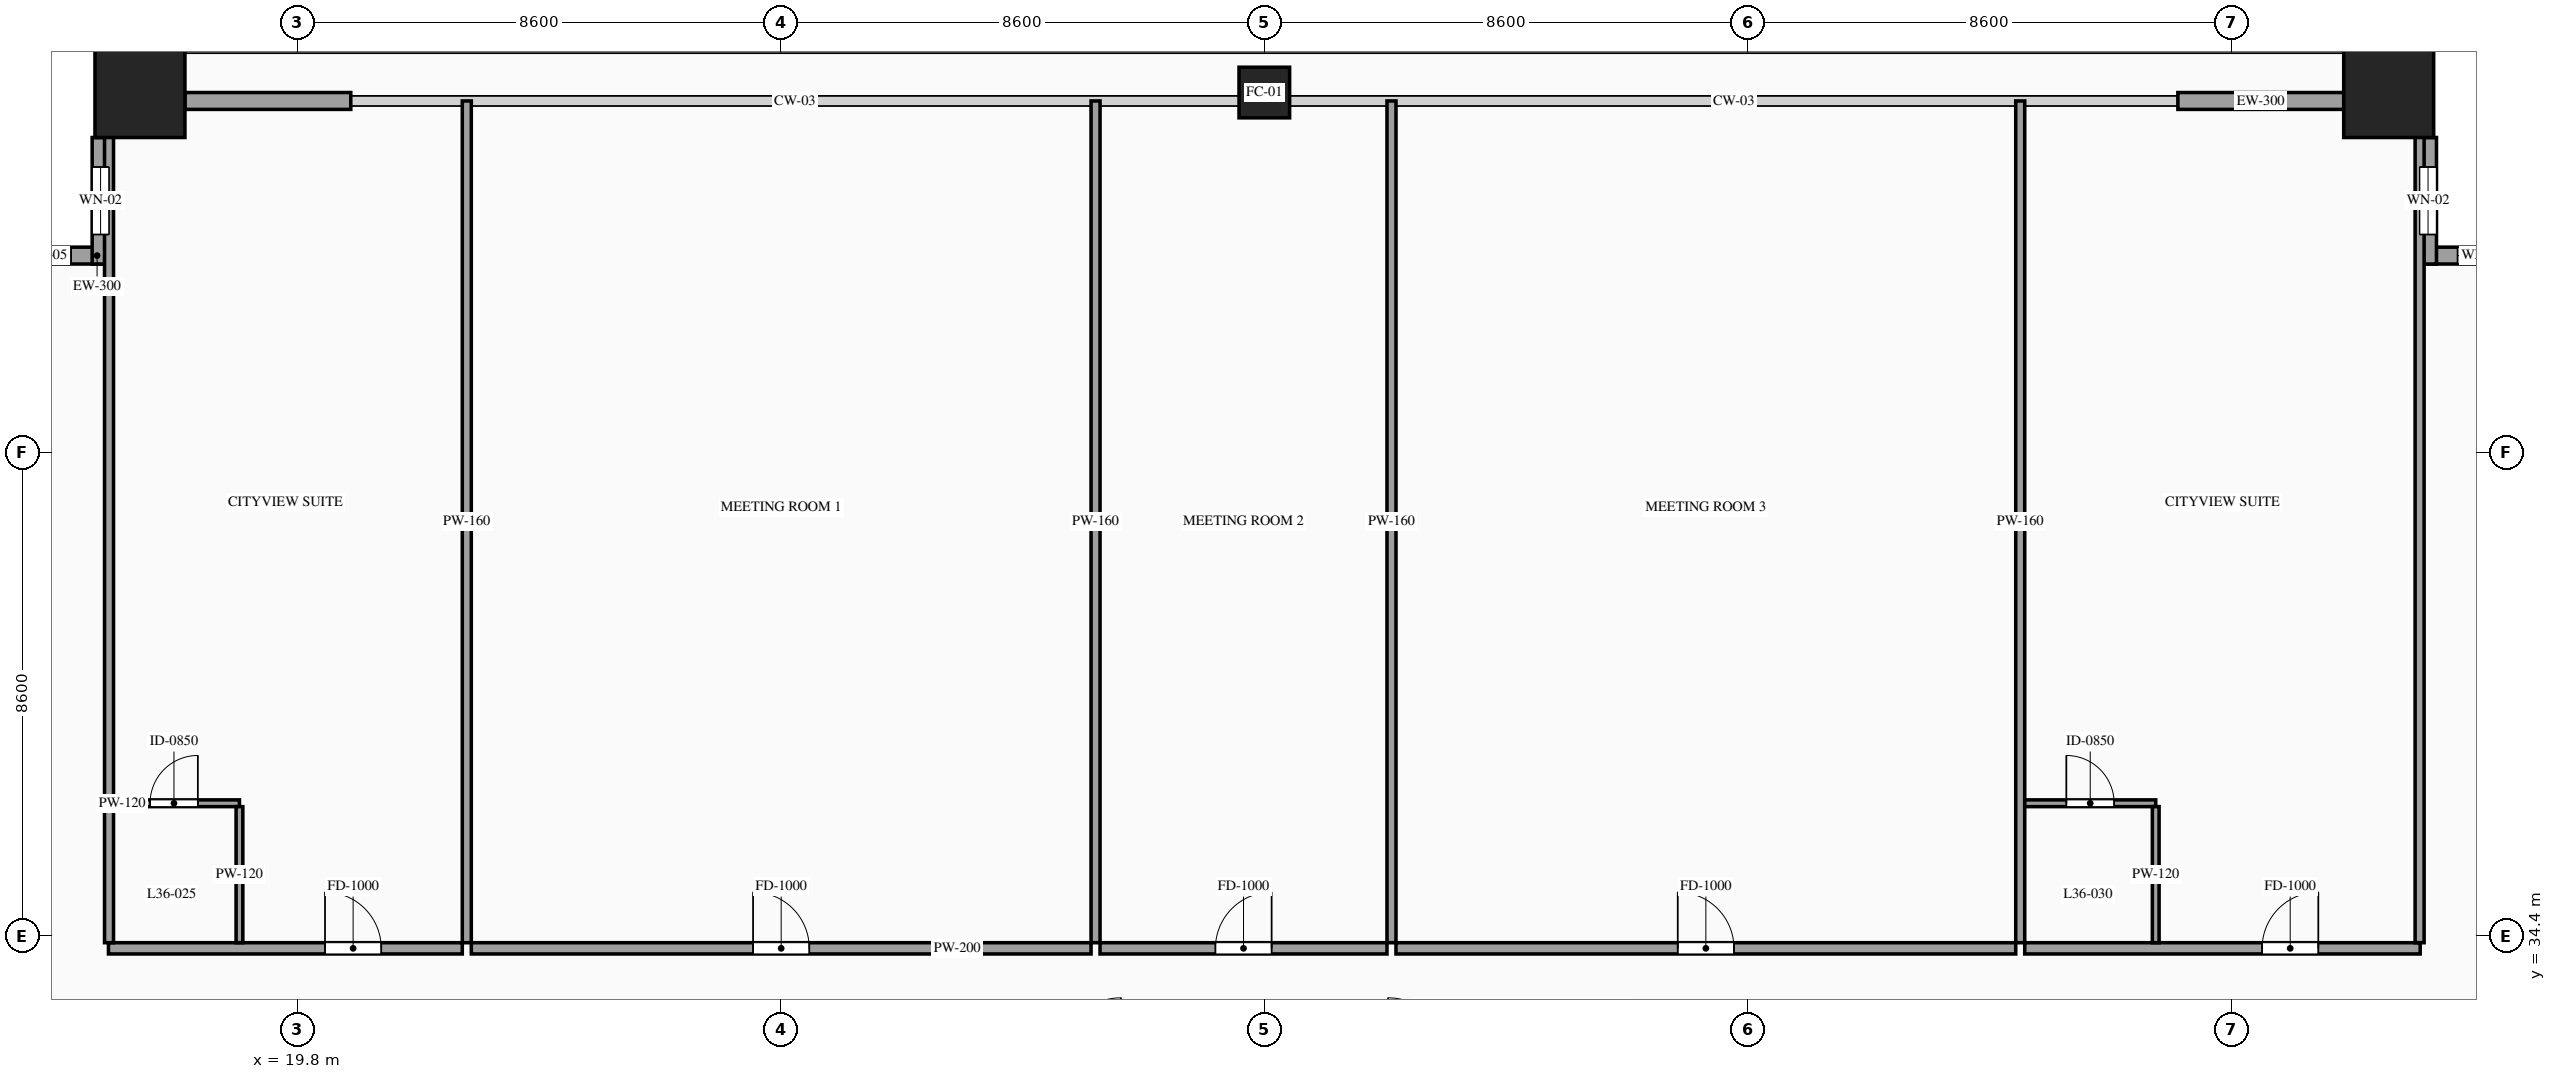
"""IFC4 building model, lengths in metres.
Left out: names, types, materials, properties, quantities, classifications, styles, units other than length and angle.
Written with IfcOpenShell. Run it as: python <this file> out.ifc"""

import sys

from ifc_helpers import new_model, si_unit, direction, frame, frame_2d, origin, origin_2d, place, context, subcontext, project, spatial, rectangle, hollow_rectangle, extrude, source, transform, mapped, element, fill, save


model = new_model("IFC4")
c1 = context("Model", 3, precision=1e-05, world=origin(), true_north=direction((0.0, 1.0)))
c2 = subcontext(c1, "Body", "Model", "MODEL_VIEW")
j1 = project(units=[si_unit("LENGTHUNIT", "METRE"), si_unit("PLANEANGLEUNIT", "RADIAN")], contexts=[c1])
p1 = place(None, origin())
s1 = spatial("IfcSite", under=j1, at=p1, CompositionType="ELEMENT")
p2 = place(p1, origin())
s2 = spatial("IfcBuilding", under=s1, at=p2, CompositionType="ELEMENT")
p3 = place(p2, frame((0.0, 0.0, 138.0)))
s3 = spatial("IfcBuildingStorey", under=s2, at=p3, CompositionType="ELEMENT", Elevation=138.0)
m1 = source(origin(), c2, "Body", "SweptSolid", [
    extrude(hollow_rectangle(XDim=1.6, YDim=1.6, WallThickness=0.07, at=origin_2d()), origin(), (0.0, 0.0, 1.0), 3.6),
])
p4 = place(p3, frame((17.0, 49.4, 0.0), z_axis=(0.0, 0.0, 1.0), x_axis=(1.0, 0.0, 0.0)))
e1 = element("IfcColumn", 1, at=p4, inside=s3, PredefinedType="COLUMN", context=c2, shape_type="MappedRepresentation", body=[
    mapped(m1, transform((0.0, 0.0, 0.0), scale=1.0)),
])
m2 = source(origin(), c2, "Body", "SweptSolid", [
    extrude(hollow_rectangle(XDim=0.9, YDim=0.9, WallThickness=0.042, at=origin_2d()), origin(), (0.0, 0.0, 1.0), 3.6),
])
p5 = place(p3, frame((37.0, 49.4, 0.0), z_axis=(0.0, 0.0, 1.0), x_axis=(1.0, 0.0, 0.0)))
e2 = element("IfcColumn", 2, at=p5, inside=s3, PredefinedType="COLUMN", context=c2, shape_type="MappedRepresentation", body=[
    mapped(m2, transform((0.0, 0.0, 0.0), scale=1.0)),
])
p6 = place(p3, frame((57.0, 49.4, 0.0), z_axis=(0.0, 0.0, 1.0), x_axis=(1.0, 0.0, 0.0)))
e3 = element("IfcColumn", 3, at=p6, inside=s3, PredefinedType="COLUMN", context=c2, shape_type="MappedRepresentation", body=[
    mapped(m1, transform((0.0, 0.0, 0.0), scale=1.0)),
])
p7 = place(p3, frame((16.45, 46.5, 0.0), z_axis=(0.0, 0.0, 1.0), x_axis=(-1.0, 0.0, 0.0)))
e4 = element("IfcWall", 4, at=p7, inside=s3, PredefinedType="SOLIDWALL", context=c2, shape_type="SweptSolid", body=[
    extrude(rectangle(XDim=2.25, YDim=0.3, at=frame_2d((1.125, 0.0))), origin(), (0.0, 0.0, 1.0), 3.38),
])
p8 = place(p7, frame((0.675, 0.0, 0.85)))
e5 = element("IfcOpeningElement", 5, at=p8, cuts=e4, PredefinedType="OPENING", context=c2, shape_type="SweptSolid", body=[
    extrude(rectangle(XDim=0.9, YDim=1.5, at=frame_2d((0.45, 0.75))), frame((0.0, 0.165, 0.0), z_axis=(0.0, -1.0, 0.0), x_axis=(1.0, 0.0, 0.0)), (0.0, 0.0, 1.0), 0.33),
])
p9 = place(p3, frame((16.3, 48.6, 0.0), z_axis=(0.0, 0.0, 1.0), x_axis=(0.0, -1.0, 0.0)))
e6 = element("IfcWall", 6, at=p9, inside=s3, PredefinedType="SOLIDWALL", context=c2, shape_type="SweptSolid", body=[
    extrude(rectangle(XDim=2.25, YDim=0.3, at=frame_2d((1.125, 0.0))), origin(), (0.0, 0.0, 1.0), 3.38),
])
p10 = place(p9, frame((0.525, 0.0, 0.85)))
e7 = element("IfcOpeningElement", 7, at=p10, cuts=e6, PredefinedType="OPENING", context=c2, shape_type="SweptSolid", body=[
    extrude(rectangle(XDim=1.2, YDim=2.1, at=frame_2d((0.6, 1.05))), frame((0.0, 0.165, 0.0), z_axis=(0.0, -1.0, 0.0), x_axis=(1.0, 0.0, 0.0)), (0.0, 0.0, 1.0), 0.33),
])
p11 = place(p3, frame((59.8, 46.5, 0.0), z_axis=(0.0, 0.0, 1.0), x_axis=(-1.0, 0.0, 0.0)))
e8 = element("IfcWall", 8, at=p11, inside=s3, PredefinedType="SOLIDWALL", context=c2, shape_type="SweptSolid", body=[
    extrude(rectangle(XDim=2.25, YDim=0.3, at=frame_2d((1.125, 0.0))), origin(), (0.0, 0.0, 1.0), 3.38),
])
p12 = place(p11, frame((0.675, 0.0, 0.85)))
e9 = element("IfcOpeningElement", 9, at=p12, cuts=e8, PredefinedType="OPENING", context=c2, shape_type="SweptSolid", body=[
    extrude(rectangle(XDim=0.9, YDim=1.5, at=frame_2d((0.45, 0.75))), frame((0.0, 0.165, 0.0), z_axis=(0.0, -1.0, 0.0), x_axis=(1.0, 0.0, 0.0)), (0.0, 0.0, 1.0), 0.33),
])
p13 = place(p3, frame((57.7, 46.35, 0.0), z_axis=(0.0, 0.0, 1.0), x_axis=(0.0, 1.0, 0.0)))
e10 = element("IfcWall", 10, at=p13, inside=s3, PredefinedType="SOLIDWALL", context=c2, shape_type="SweptSolid", body=[
    extrude(rectangle(XDim=2.25, YDim=0.3, at=frame_2d((1.125, 0.0))), origin(), (0.0, 0.0, 1.0), 3.38),
])
p14 = place(p13, frame((0.525, 0.0, 0.85)))
e11 = element("IfcOpeningElement", 11, at=p14, cuts=e10, PredefinedType="OPENING", context=c2, shape_type="SweptSolid", body=[
    extrude(rectangle(XDim=1.2, YDim=2.1, at=frame_2d((0.6, 1.05))), frame((0.0, 0.165, 0.0), z_axis=(0.0, -1.0, 0.0), x_axis=(1.0, 0.0, 0.0)), (0.0, 0.0, 1.0), 0.33),
])
m3 = source(origin(), c2, "Body", "SweptSolid", [
    extrude(rectangle(XDim=2.95, YDim=0.3, at=frame_2d((1.475, 0.0))), origin(), (0.0, 0.0, 1.0), 2.775),
])
for number, where, z_axis, x_axis in (
    (12, (17.8, 49.25, 0.0), (0.0, 0.0, 1.0), (1.0, 0.0, 0.0)),
    (13, (53.25, 49.25, 0.0), (0.0, 0.0, 1.0), (1.0, 0.0, 0.0)),
):
    element("IfcWall", number, at=place(p3, frame(where, z_axis=z_axis, x_axis=x_axis)), inside=s3, PredefinedType="SOLIDWALL", context=c2, shape_type="MappedRepresentation", body=[
        mapped(m3, transform((0.0, 0.0, 0.0), scale=1.0)),
    ])
p15 = place(p3, frame((16.44, 34.18, 0.0), z_axis=(0.0, 0.0, 1.0), x_axis=(1.0, 0.0, 0.0)))
e14 = element("IfcWall", 14, at=p15, inside=s3, PredefinedType="PARTITIONING", context=c2, shape_type="SweptSolid", body=[
    extrude(rectangle(XDim=6.294, YDim=0.2, at=frame_2d((3.147, 0.0))), origin(), (0.0, 0.0, 1.0), 3.38),
])
p16 = place(p15, frame((3.852, 0.0, 0.0)))
e15 = element("IfcOpeningElement", 15, at=p16, cuts=e14, PredefinedType="OPENING", context=c2, shape_type="SweptSolid", body=[
    extrude(rectangle(XDim=1.0, YDim=2.2, at=frame_2d((0.5, 1.1))), frame((0.0, 0.115, 0.0), z_axis=(0.0, -1.0, 0.0), x_axis=(1.0, 0.0, 0.0)), (0.0, 0.0, 1.0), 0.23),
])
m4 = source(origin(), c2, "Body", "SweptSolid", [
    extrude(rectangle(XDim=14.97, YDim=0.16, at=frame_2d((7.485, 0.0))), origin(), (0.0, 0.0, 1.0), 3.38),
])
p17 = place(p3, frame((22.814, 34.28, 0.0), z_axis=(0.0, 0.0, 1.0), x_axis=(0.0, 1.0, 0.0)))
e16 = element("IfcWall", 16, at=p17, inside=s3, PredefinedType="PARTITIONING", context=c2, shape_type="MappedRepresentation", body=[
    mapped(m4, transform((0.0, 0.0, 0.0), scale=1.0)),
])
p18 = place(p3, frame((16.44, 36.76, 0.0), z_axis=(0.0, 0.0, 1.0), x_axis=(1.0, 0.0, 0.0)))
e17 = element("IfcWall", 17, at=p18, inside=s3, PredefinedType="PARTITIONING", context=c2, shape_type="SweptSolid", body=[
    extrude(rectangle(XDim=2.33, YDim=0.12, at=frame_2d((1.165, 0.0))), origin(), (0.0, 0.0, 1.0), 3.38),
])
p19 = place(p18, frame((0.74, 0.0, 0.0)))
e18 = element("IfcOpeningElement", 18, at=p19, cuts=e17, PredefinedType="OPENING", context=c2, shape_type="SweptSolid", body=[
    extrude(rectangle(XDim=0.85, YDim=2.1, at=frame_2d((0.425, 1.05))), frame((0.0, 0.075, 0.0), z_axis=(0.0, -1.0, 0.0), x_axis=(1.0, 0.0, 0.0)), (0.0, 0.0, 1.0), 0.15),
])
m5 = source(origin(), c2, "Body", "SweptSolid", [
    extrude(rectangle(XDim=2.42, YDim=0.12, at=frame_2d((1.21, 0.0))), origin(), (0.0, 0.0, 1.0), 3.38),
])
p20 = place(p3, frame((18.77, 34.28, 0.0), z_axis=(0.0, 0.0, 1.0), x_axis=(0.0, 1.0, 0.0)))
e19 = element("IfcWall", 19, at=p20, inside=s3, PredefinedType="PARTITIONING", context=c2, shape_type="MappedRepresentation", body=[
    mapped(m5, transform((0.0, 0.0, 0.0), scale=1.0)),
])
p21 = place(p3, frame((22.894, 34.18, 0.0), z_axis=(0.0, 0.0, 1.0), x_axis=(1.0, 0.0, 0.0)))
e20 = element("IfcWall", 20, at=p21, inside=s3, PredefinedType="PARTITIONING", context=c2, shape_type="SweptSolid", body=[
    extrude(rectangle(XDim=11.024, YDim=0.2, at=frame_2d((5.512, 0.0))), origin(), (0.0, 0.0, 1.0), 3.38),
])
p22 = place(p21, frame((5.012, 0.0, 0.0)))
e21 = element("IfcOpeningElement", 21, at=p22, cuts=e20, PredefinedType="OPENING", context=c2, shape_type="SweptSolid", body=[
    extrude(rectangle(XDim=1.0, YDim=2.2, at=frame_2d((0.5, 1.1))), frame((0.0, 0.115, 0.0), z_axis=(0.0, -1.0, 0.0), x_axis=(1.0, 0.0, 0.0)), (0.0, 0.0, 1.0), 0.23),
])
p23 = place(p3, frame((33.998, 34.28, 0.0), z_axis=(0.0, 0.0, 1.0), x_axis=(0.0, 1.0, 0.0)))
e22 = element("IfcWall", 22, at=p23, inside=s3, PredefinedType="PARTITIONING", context=c2, shape_type="MappedRepresentation", body=[
    mapped(m4, transform((0.0, 0.0, 0.0), scale=1.0)),
])
p24 = place(p3, frame((34.078, 34.18, 0.0), z_axis=(0.0, 0.0, 1.0), x_axis=(1.0, 0.0, 0.0)))
e23 = element("IfcWall", 23, at=p24, inside=s3, PredefinedType="PARTITIONING", context=c2, shape_type="SweptSolid", body=[
    extrude(rectangle(XDim=5.104, YDim=0.2, at=frame_2d((2.552, 0.0))), origin(), (0.0, 0.0, 1.0), 3.38),
])
p25 = place(p24, frame((2.052, 0.0, 0.0)))
e24 = element("IfcOpeningElement", 24, at=p25, cuts=e23, PredefinedType="OPENING", context=c2, shape_type="SweptSolid", body=[
    extrude(rectangle(XDim=1.0, YDim=2.2, at=frame_2d((0.5, 1.1))), frame((0.0, 0.115, 0.0), z_axis=(0.0, -1.0, 0.0), x_axis=(1.0, 0.0, 0.0)), (0.0, 0.0, 1.0), 0.23),
])
p26 = place(p3, frame((39.262, 34.28, 0.0), z_axis=(0.0, 0.0, 1.0), x_axis=(0.0, 1.0, 0.0)))
e25 = element("IfcWall", 25, at=p26, inside=s3, PredefinedType="PARTITIONING", context=c2, shape_type="MappedRepresentation", body=[
    mapped(m4, transform((0.0, 0.0, 0.0), scale=1.0)),
])
p27 = place(p3, frame((39.342, 34.18, 0.0), z_axis=(0.0, 0.0, 1.0), x_axis=(1.0, 0.0, 0.0)))
e26 = element("IfcWall", 26, at=p27, inside=s3, PredefinedType="PARTITIONING", context=c2, shape_type="SweptSolid", body=[
    extrude(rectangle(XDim=11.024, YDim=0.2, at=frame_2d((5.512, 0.0))), origin(), (0.0, 0.0, 1.0), 3.38),
])
p28 = place(p27, frame((5.012, 0.0, 0.0)))
e27 = element("IfcOpeningElement", 27, at=p28, cuts=e26, PredefinedType="OPENING", context=c2, shape_type="SweptSolid", body=[
    extrude(rectangle(XDim=1.0, YDim=2.2, at=frame_2d((0.5, 1.1))), frame((0.0, 0.115, 0.0), z_axis=(0.0, -1.0, 0.0), x_axis=(1.0, 0.0, 0.0)), (0.0, 0.0, 1.0), 0.23),
])
p29 = place(p3, frame((50.446, 34.28, 0.0), z_axis=(0.0, 0.0, 1.0), x_axis=(0.0, 1.0, 0.0)))
e28 = element("IfcWall", 28, at=p29, inside=s3, PredefinedType="PARTITIONING", context=c2, shape_type="MappedRepresentation", body=[
    mapped(m4, transform((0.0, 0.0, 0.0), scale=1.0)),
])
p30 = place(p3, frame((50.526, 34.18, 0.0), z_axis=(0.0, 0.0, 1.0), x_axis=(1.0, 0.0, 0.0)))
e29 = element("IfcWall", 29, at=p30, inside=s3, PredefinedType="PARTITIONING", context=c2, shape_type="SweptSolid", body=[
    extrude(rectangle(XDim=7.034, YDim=0.2, at=frame_2d((3.517, 0.0))), origin(), (0.0, 0.0, 1.0), 3.38),
])
p31 = place(p30, frame((4.222, 0.0, 0.0)))
e30 = element("IfcOpeningElement", 30, at=p31, cuts=e29, PredefinedType="OPENING", context=c2, shape_type="SweptSolid", body=[
    extrude(rectangle(XDim=1.0, YDim=2.2, at=frame_2d((0.5, 1.1))), frame((0.0, 0.115, 0.0), z_axis=(0.0, -1.0, 0.0), x_axis=(1.0, 0.0, 0.0)), (0.0, 0.0, 1.0), 0.23),
])
m6 = source(origin(), c2, "Body", "SweptSolid", [
    extrude(rectangle(XDim=14.82, YDim=0.16, at=frame_2d((7.41, 0.0))), origin(), (0.0, 0.0, 1.0), 3.38),
])
for number, where, z_axis, x_axis in (
    (31, (16.45, 34.28, 0.0), (0.0, 0.0, 1.0), (0.0, 1.0, 0.0)),
    (32, (57.55, 34.28, 0.0), (0.0, 0.0, 1.0), (0.0, 1.0, 0.0)),
):
    element("IfcWall", number, at=place(p3, frame(where, z_axis=z_axis, x_axis=x_axis)), inside=s3, PredefinedType="PARTITIONING", context=c2, shape_type="MappedRepresentation", body=[
        mapped(m6, transform((0.0, 0.0, 0.0), scale=1.0)),
    ])
p32 = place(p3, frame((50.526, 36.76, 0.0), z_axis=(0.0, 0.0, 1.0), x_axis=(1.0, 0.0, 0.0)))
e33 = element("IfcWall", 33, at=p32, inside=s3, PredefinedType="PARTITIONING", context=c2, shape_type="SweptSolid", body=[
    extrude(rectangle(XDim=2.33, YDim=0.12, at=frame_2d((1.165, 0.0))), origin(), (0.0, 0.0, 1.0), 3.38),
])
p33 = place(p32, frame((0.74, 0.0, 0.0)))
e34 = element("IfcOpeningElement", 34, at=p33, cuts=e33, PredefinedType="OPENING", context=c2, shape_type="SweptSolid", body=[
    extrude(rectangle(XDim=0.85, YDim=2.1, at=frame_2d((0.425, 1.05))), frame((0.0, 0.075, 0.0), z_axis=(0.0, -1.0, 0.0), x_axis=(1.0, 0.0, 0.0)), (0.0, 0.0, 1.0), 0.15),
])
p34 = place(p3, frame((52.856, 34.28, 0.0), z_axis=(0.0, 0.0, 1.0), x_axis=(0.0, 1.0, 0.0)))
e35 = element("IfcWall", 35, at=p34, inside=s3, PredefinedType="PARTITIONING", context=c2, shape_type="MappedRepresentation", body=[
    mapped(m5, transform((0.0, 0.0, 0.0), scale=1.0)),
])
m7 = source(origin(), c2, "Body", "SweptSolid", [
    extrude(rectangle(XDim=0.9, YDim=1.5, at=frame_2d((0.45, 0.75))), frame((0.0, 0.03, 0.0), z_axis=(0.0, -1.0, 0.0), x_axis=(1.0, 0.0, 0.0)), (0.0, 0.0, 1.0), 0.06),
])
p35 = place(p8, origin())
e36 = element("IfcWindow", 36, at=p35, inside=s3, PartitioningType="SINGLE_PANEL", PredefinedType="WINDOW", context=c2, shape_type="MappedRepresentation", body=[
    mapped(m7, transform((0.0, 0.0, 0.0), scale=1.0)),
])
fill(e5, e36)
m8 = source(origin(), c2, "Body", "SweptSolid", [
    extrude(rectangle(XDim=1.2, YDim=2.1, at=frame_2d((0.6, 1.05))), frame((0.0, 0.03, 0.0), z_axis=(0.0, -1.0, 0.0), x_axis=(1.0, 0.0, 0.0)), (0.0, 0.0, 1.0), 0.06),
])
p36 = place(p10, origin())
e37 = element("IfcWindow", 37, at=p36, inside=s3, PartitioningType="SINGLE_PANEL", PredefinedType="WINDOW", context=c2, shape_type="MappedRepresentation", body=[
    mapped(m8, transform((0.0, 0.0, 0.0), scale=1.0)),
])
fill(e7, e37)
p37 = place(p12, origin())
e38 = element("IfcWindow", 38, at=p37, inside=s3, PartitioningType="SINGLE_PANEL", PredefinedType="WINDOW", context=c2, shape_type="MappedRepresentation", body=[
    mapped(m7, transform((0.0, 0.0, 0.0), scale=1.0)),
])
fill(e9, e38)
p38 = place(p14, origin())
e39 = element("IfcWindow", 39, at=p38, inside=s3, PartitioningType="SINGLE_PANEL", PredefinedType="WINDOW", context=c2, shape_type="MappedRepresentation", body=[
    mapped(m8, transform((0.0, 0.0, 0.0), scale=1.0)),
])
fill(e11, e39)
m9 = source(origin(), c2, "Body", "SweptSolid", [
    extrude(rectangle(XDim=1.0, YDim=2.2, at=frame_2d((0.5, 1.1))), frame((0.0, 0.025, 0.0), z_axis=(0.0, -1.0, 0.0), x_axis=(1.0, 0.0, 0.0)), (0.0, 0.0, 1.0), 0.05),
])
p39 = place(p16, origin())
e40 = element("IfcDoor", 40, at=p39, inside=s3, OperationType="SINGLE_SWING_LEFT", PredefinedType="DOOR", context=c2, shape_type="MappedRepresentation", body=[
    mapped(m9, transform((0.0, 0.0, 0.0), scale=1.0)),
])
fill(e15, e40)
m10 = source(origin(), c2, "Body", "SweptSolid", [
    extrude(rectangle(XDim=0.85, YDim=2.1, at=frame_2d((0.425, 1.05))), frame((0.0, 0.025, 0.0), z_axis=(0.0, -1.0, 0.0), x_axis=(1.0, 0.0, 0.0)), (0.0, 0.0, 1.0), 0.05),
])
p40 = place(p19, origin())
e41 = element("IfcDoor", 41, at=p40, inside=s3, OperationType="SINGLE_SWING_RIGHT", PredefinedType="DOOR", context=c2, shape_type="MappedRepresentation", body=[
    mapped(m10, transform((0.0, 0.0, 0.0), scale=1.0)),
])
fill(e18, e41)
p41 = place(p22, origin())
e42 = element("IfcDoor", 42, at=p41, inside=s3, OperationType="SINGLE_SWING_LEFT", PredefinedType="DOOR", context=c2, shape_type="MappedRepresentation", body=[
    mapped(m9, transform((0.0, 0.0, 0.0), scale=1.0)),
])
fill(e21, e42)
p42 = place(p25, origin())
e43 = element("IfcDoor", 43, at=p42, inside=s3, OperationType="SINGLE_SWING_RIGHT", PredefinedType="DOOR", context=c2, shape_type="MappedRepresentation", body=[
    mapped(m9, transform((0.0, 0.0, 0.0), scale=1.0)),
])
fill(e24, e43)
p43 = place(p28, origin())
e44 = element("IfcDoor", 44, at=p43, inside=s3, OperationType="SINGLE_SWING_LEFT", PredefinedType="DOOR", context=c2, shape_type="MappedRepresentation", body=[
    mapped(m9, transform((0.0, 0.0, 0.0), scale=1.0)),
])
fill(e27, e44)
p44 = place(p31, origin())
e45 = element("IfcDoor", 45, at=p44, inside=s3, OperationType="SINGLE_SWING_RIGHT", PredefinedType="DOOR", context=c2, shape_type="MappedRepresentation", body=[
    mapped(m9, transform((0.0, 0.0, 0.0), scale=1.0)),
])
fill(e30, e45)
p45 = place(p33, origin())
e46 = element("IfcDoor", 46, at=p45, inside=s3, OperationType="SINGLE_SWING_LEFT", PredefinedType="DOOR", context=c2, shape_type="MappedRepresentation", body=[
    mapped(m10, transform((0.0, 0.0, 0.0), scale=1.0)),
])
fill(e34, e46)
save(model, sys.argv[1])
